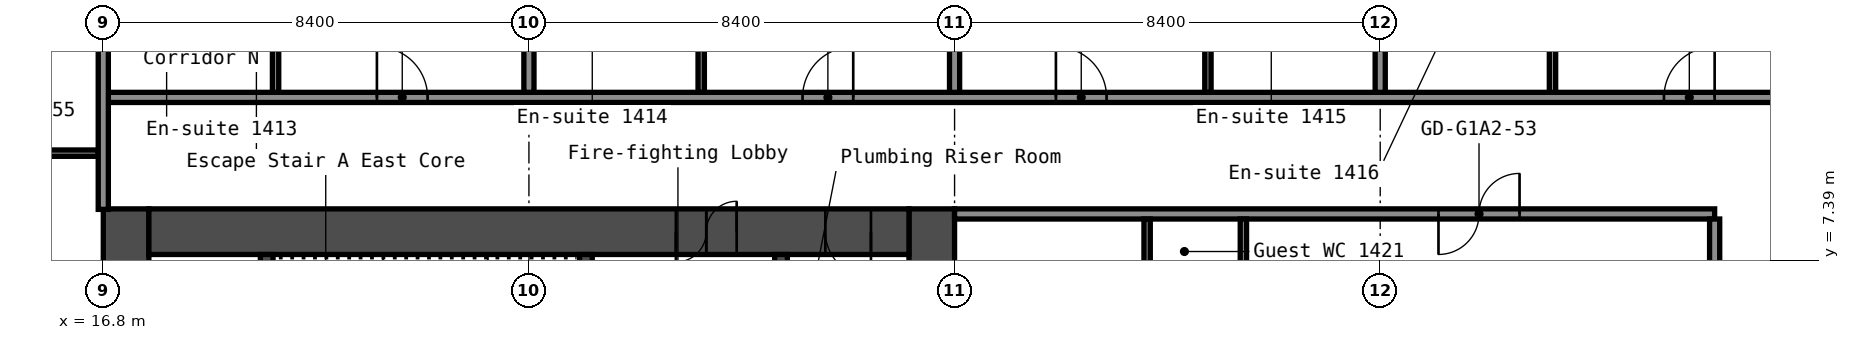
"""IFC4 building model, lengths in metres.
Left out: names, types, materials, properties, quantities, classifications, styles, units other than length and angle.
Written with IfcOpenShell. Run it as: python <this file> out.ifc"""

import sys

from ifc_helpers import new_model, si_unit, direction, frame, frame_2d, origin, place, context, subcontext, project, spatial, rectangle, extrude, element, fill, save


model = new_model("IFC4")
c1 = context("Model", 3, precision=1e-05, world=origin(), true_north=direction((0.0, 1.0)))
c2 = subcontext(c1, "Body", "Model", "MODEL_VIEW")
j1 = project(units=[si_unit("LENGTHUNIT", "METRE"), si_unit("PLANEANGLEUNIT", "RADIAN")], contexts=[c1])
p1 = place(None, origin())
s1 = spatial("IfcSite", under=j1, at=p1, CompositionType="ELEMENT")
p2 = place(p1, origin())
s2 = spatial("IfcBuilding", under=s1, at=p2, CompositionType="ELEMENT")
p3 = place(p2, frame((0.0, 0.0, 51.8)))
s3 = spatial("IfcBuildingStorey", under=s2, at=p3, CompositionType="ELEMENT", Elevation=51.8)
p4 = place(p3, frame((17.25, -8.4, 0.0), z_axis=(0.0, 0.0, 1.0), x_axis=(0.0, 1.0, 0.0)))
e1 = element("IfcWall", 1, at=p4, inside=s3, PredefinedType="SHEAR", context=c2, shape_type="SweptSolid", body=[
    extrude(rectangle(XDim=16.8, YDim=0.9, at=frame_2d((8.4, 0.0))), origin(), (0.0, 0.0, 1.0), 2.8),
])
p5 = place(p4, frame((12.75, 0.0, 0.0)))
e2 = element("IfcOpeningElement", 2, at=p5, cuts=e1, PredefinedType="OPENING", context=c2, shape_type="SweptSolid", body=[
    extrude(rectangle(XDim=1.2, YDim=2.1, at=frame_2d((0.6, 1.05))), frame((0.0, 0.46, 0.0), z_axis=(0.0, -1.0, 0.0), x_axis=(1.0, 0.0, 0.0)), (0.0, 0.0, 1.0), 0.92),
])
p6 = place(p4, frame((2.85, 0.0, 0.0)))
e3 = element("IfcOpeningElement", 3, at=p6, cuts=e1, PredefinedType="OPENING", context=c2, shape_type="SweptSolid", body=[
    extrude(rectangle(XDim=1.2, YDim=2.1, at=frame_2d((0.6, 1.05))), frame((0.0, 0.46, 0.0), z_axis=(0.0, -1.0, 0.0), x_axis=(1.0, 0.0, 0.0)), (0.0, 0.0, 1.0), 0.92),
])
p7 = place(p3, frame((33.15, -8.4, 0.0), z_axis=(0.0, 0.0, 1.0), x_axis=(0.0, 1.0, 0.0)))
e4 = element("IfcWall", 4, at=p7, inside=s3, PredefinedType="SHEAR", context=c2, shape_type="SweptSolid", body=[
    extrude(rectangle(XDim=16.8, YDim=0.9, at=frame_2d((8.4, 0.0))), origin(), (0.0, 0.0, 1.0), 2.8),
])
p8 = place(p3, frame((17.7, 7.95, 0.0), z_axis=(0.0, 0.0, 1.0), x_axis=(1.0, 0.0, 0.0)))
e5 = element("IfcWall", 5, at=p8, inside=s3, PredefinedType="SHEAR", context=c2, shape_type="SweptSolid", body=[
    extrude(rectangle(XDim=15.0, YDim=0.9, at=frame_2d((7.5, 0.0))), origin(), (0.0, 0.0, 1.0), 2.8),
])
p9 = place(p8, frame((10.4, 0.0, 0.0)))
e6 = element("IfcOpeningElement", 6, at=p9, cuts=e5, PredefinedType="OPENING", context=c2, shape_type="SweptSolid", body=[
    extrude(rectangle(XDim=1.2, YDim=2.1, at=frame_2d((0.6, 1.05))), frame((0.0, 0.46, 0.0), z_axis=(0.0, -1.0, 0.0), x_axis=(1.0, 0.0, 0.0)), (0.0, 0.0, 1.0), 0.92),
])
p10 = place(p8, frame((13.35, 0.0, 0.0)))
e7 = element("IfcOpeningElement", 7, at=p10, cuts=e5, PredefinedType="OPENING", context=c2, shape_type="SweptSolid", body=[
    extrude(rectangle(XDim=0.9, YDim=2.1, at=frame_2d((0.45, 1.05))), frame((0.0, 0.46, 0.0), z_axis=(0.0, -1.0, 0.0), x_axis=(1.0, 0.0, 0.0)), (0.0, 0.0, 1.0), 0.92),
])
p11 = place(p3, frame((20.025, 1.2, 0.0), z_axis=(0.0, 0.0, 1.0), x_axis=(0.0, 1.0, 0.0)))
e8 = element("IfcWall", 8, at=p11, inside=s3, PredefinedType="SHEAR", context=c2, shape_type="SweptSolid", body=[
    extrude(rectangle(XDim=6.3, YDim=0.25, at=frame_2d((3.15, 0.0))), origin(), (0.0, 0.0, 1.0), 2.8),
])
p12 = place(p3, frame((26.325, 3.75, 0.0), z_axis=(0.0, 0.0, 1.0), x_axis=(0.0, 1.0, 0.0)))
e9 = element("IfcWall", 9, at=p12, inside=s3, PredefinedType="SHEAR", context=c2, shape_type="SweptSolid", body=[
    extrude(rectangle(XDim=3.75, YDim=0.25, at=frame_2d((1.875, 0.0))), origin(), (0.0, 0.0, 1.0), 2.8),
])
p13 = place(p12, frame((1.25, 0.0, 0.0)))
e10 = element("IfcOpeningElement", 10, at=p13, cuts=e9, PredefinedType="OPENING", context=c2, shape_type="SweptSolid", body=[
    extrude(rectangle(XDim=1.2, YDim=2.1, at=frame_2d((0.6, 1.05))), frame((0.0, 0.135, 0.0), z_axis=(0.0, -1.0, 0.0), x_axis=(1.0, 0.0, 0.0)), (0.0, 0.0, 1.0), 0.27),
])
p14 = place(p3, frame((30.175, 1.45, 0.0), z_axis=(0.0, 0.0, 1.0), x_axis=(0.0, 1.0, 0.0)))
e11 = element("IfcWall", 11, at=p14, inside=s3, PredefinedType="SHEAR", context=c2, shape_type="SweptSolid", body=[
    extrude(rectangle(XDim=6.05, YDim=0.25, at=frame_2d((3.025, 0.0))), origin(), (0.0, 0.0, 1.0), 2.8),
])
p15 = place(p14, frame((2.625, 0.0, 0.0)))
e12 = element("IfcOpeningElement", 12, at=p15, cuts=e11, PredefinedType="OPENING", context=c2, shape_type="SweptSolid", body=[
    extrude(rectangle(XDim=1.1, YDim=2.1, at=frame_2d((0.55, 1.05))), frame((0.0, 0.135, 0.0), z_axis=(0.0, -1.0, 0.0), x_axis=(1.0, 0.0, 0.0)), (0.0, 0.0, 1.0), 0.27),
])
p16 = place(p3, frame((33.6, 8.3, 0.0), z_axis=(0.0, 0.0, 1.0), x_axis=(1.0, 0.0, 0.0)))
e13 = element("IfcWall", 13, at=p16, inside=s3, PredefinedType="PARTITIONING", context=c2, shape_type="SweptSolid", body=[
    extrude(rectangle(XDim=15.0, YDim=0.2, at=frame_2d((7.5, 0.0))), origin(), (0.0, 0.0, 1.0), 2.8),
])
p17 = place(p16, frame((9.55, 0.0, 0.0)))
e14 = element("IfcOpeningElement", 14, at=p17, cuts=e13, PredefinedType="OPENING", context=c2, shape_type="SweptSolid", body=[
    extrude(rectangle(XDim=1.6, YDim=2.1, at=frame_2d((0.8, 1.05))), frame((0.0, 0.11, 0.0), z_axis=(0.0, -1.0, 0.0), x_axis=(1.0, 0.0, 0.0)), (0.0, 0.0, 1.0), 0.22),
])
p18 = place(p3, frame((13.462, 9.5, 0.0), z_axis=(0.0, 0.0, 1.0), x_axis=(1.0, 0.0, 0.0)))
e15 = element("IfcWall", 15, at=p18, inside=s3, PredefinedType="PARTITIONING", context=c2, shape_type="SweptSolid", body=[
    extrude(rectangle(XDim=3.238, YDim=0.125, at=frame_2d((1.619, 0.0))), origin(), (0.0, 0.0, 1.0), 2.8),
])
p19 = place(p18, frame((1.238, 0.0, 0.0)))
e16 = element("IfcOpeningElement", 16, at=p19, cuts=e15, PredefinedType="OPENING", context=c2, shape_type="SweptSolid", body=[
    extrude(rectangle(XDim=0.8, YDim=2.1, at=frame_2d((0.4, 1.05))), frame((0.0, 0.073, 0.0), z_axis=(0.0, -1.0, 0.0), x_axis=(1.0, 0.0, 0.0)), (0.0, 0.0, 1.0), 0.145),
])
p20 = place(p3, frame((16.8, 10.6, 0.0), z_axis=(0.0, 0.0, 1.0), x_axis=(1.0, 0.0, 0.0)))
e17 = element("IfcWall", 17, at=p20, inside=s3, PredefinedType="PARTITIONING", context=c2, shape_type="SweptSolid", body=[
    extrude(rectangle(XDim=34.3, YDim=0.2, at=frame_2d((17.15, 0.0))), origin(), (0.0, 0.0, 1.0), 2.8),
])
p21 = place(p20, frame((5.4, 0.0, 0.0)))
e18 = element("IfcOpeningElement", 18, at=p21, cuts=e17, PredefinedType="OPENING", context=c2, shape_type="SweptSolid", body=[
    extrude(rectangle(XDim=1.0, YDim=2.1, at=frame_2d((0.5, 1.05))), frame((0.0, 0.11, 0.0), z_axis=(0.0, -1.0, 0.0), x_axis=(1.0, 0.0, 0.0)), (0.0, 0.0, 1.0), 0.22),
])
p22 = place(p20, frame((13.8, 0.0, 0.0)))
e19 = element("IfcOpeningElement", 19, at=p22, cuts=e17, PredefinedType="OPENING", context=c2, shape_type="SweptSolid", body=[
    extrude(rectangle(XDim=1.0, YDim=2.1, at=frame_2d((0.5, 1.05))), frame((0.0, 0.11, 0.0), z_axis=(0.0, -1.0, 0.0), x_axis=(1.0, 0.0, 0.0)), (0.0, 0.0, 1.0), 0.22),
])
p23 = place(p20, frame((18.8, 0.0, 0.0)))
e20 = element("IfcOpeningElement", 20, at=p23, cuts=e17, PredefinedType="OPENING", context=c2, shape_type="SweptSolid", body=[
    extrude(rectangle(XDim=1.0, YDim=2.1, at=frame_2d((0.5, 1.05))), frame((0.0, 0.11, 0.0), z_axis=(0.0, -1.0, 0.0), x_axis=(1.0, 0.0, 0.0)), (0.0, 0.0, 1.0), 0.22),
])
p24 = place(p20, frame((30.8, 0.0, 0.0)))
e21 = element("IfcOpeningElement", 21, at=p24, cuts=e17, PredefinedType="OPENING", context=c2, shape_type="SweptSolid", body=[
    extrude(rectangle(XDim=1.0, YDim=2.1, at=frame_2d((0.5, 1.05))), frame((0.0, 0.11, 0.0), z_axis=(0.0, -1.0, 0.0), x_axis=(1.0, 0.0, 0.0)), (0.0, 0.0, 1.0), 0.22),
])
p25 = place(p3, frame((16.8, 8.39, 0.0), z_axis=(0.0, 0.0, 1.0), x_axis=(0.0, 1.0, 0.0)))
e22 = element("IfcWall", 22, at=p25, inside=s3, PredefinedType="PARTITIONING", context=c2, shape_type="SweptSolid", body=[
    extrude(rectangle(XDim=11.91, YDim=0.2, at=frame_2d((5.955, 0.0))), origin(), (0.0, 0.0, 1.0), 2.8),
])
p26 = place(p3, frame((20.2, 10.7, 0.0), z_axis=(0.0, 0.0, 1.0), x_axis=(0.0, 1.0, 0.0)))
e23 = element("IfcWall", 23, at=p26, inside=s3, PredefinedType="PARTITIONING", context=c2, shape_type="SweptSolid", body=[
    extrude(rectangle(XDim=3.3, YDim=0.125, at=frame_2d((1.65, 0.0))), origin(), (0.0, 0.0, 1.0), 2.8),
])
p27 = place(p3, frame((25.2, 10.7, 0.0), z_axis=(0.0, 0.0, 1.0), x_axis=(0.0, 1.0, 0.0)))
e24 = element("IfcWall", 24, at=p27, inside=s3, PredefinedType="PARTITIONING", context=c2, shape_type="SweptSolid", body=[
    extrude(rectangle(XDim=9.6, YDim=0.2, at=frame_2d((4.8, 0.0))), origin(), (0.0, 0.0, 1.0), 2.8),
])
p28 = place(p3, frame((28.6, 10.7, 0.0), z_axis=(0.0, 0.0, 1.0), x_axis=(0.0, 1.0, 0.0)))
e25 = element("IfcWall", 25, at=p28, inside=s3, PredefinedType="PARTITIONING", context=c2, shape_type="SweptSolid", body=[
    extrude(rectangle(XDim=3.3, YDim=0.125, at=frame_2d((1.65, 0.0))), origin(), (0.0, 0.0, 1.0), 2.8),
])
p29 = place(p3, frame((33.6, 10.7, 0.0), z_axis=(0.0, 0.0, 1.0), x_axis=(0.0, 1.0, 0.0)))
e26 = element("IfcWall", 26, at=p29, inside=s3, PredefinedType="PARTITIONING", context=c2, shape_type="SweptSolid", body=[
    extrude(rectangle(XDim=9.6, YDim=0.2, at=frame_2d((4.8, 0.0))), origin(), (0.0, 0.0, 1.0), 2.8),
])
for number, where, z_axis, x_axis in (
    (27, (37.4, 4.9, 0.0), (0.0, 0.0, 1.0), (0.0, 1.0, 0.0)),
    (28, (38.6, 10.7, 0.0), (0.0, 0.0, 1.0), (0.0, 1.0, 0.0)),
):
    element("IfcWall", number, at=place(p3, frame(where, z_axis=z_axis, x_axis=x_axis)), inside=s3, PredefinedType="PARTITIONING", context=c2, shape_type="SweptSolid", body=[
        extrude(rectangle(XDim=3.3, YDim=0.125, at=frame_2d((1.65, 0.0))), origin(), (0.0, 0.0, 1.0), 2.8),
    ])
p30 = place(p3, frame((39.3, 5.9, 0.0), z_axis=(0.0, 0.0, 1.0), x_axis=(0.0, 1.0, 0.0)))
e29 = element("IfcWall", 29, at=p30, inside=s3, PredefinedType="PARTITIONING", context=c2, shape_type="SweptSolid", body=[
    extrude(rectangle(XDim=2.3, YDim=0.125, at=frame_2d((1.15, 0.0))), origin(), (0.0, 0.0, 1.0), 2.8),
])
p31 = place(p3, frame((42.0, 10.7, 0.0), z_axis=(0.0, 0.0, 1.0), x_axis=(0.0, 1.0, 0.0)))
e30 = element("IfcWall", 30, at=p31, inside=s3, PredefinedType="PARTITIONING", context=c2, shape_type="SweptSolid", body=[
    extrude(rectangle(XDim=9.6, YDim=0.2, at=frame_2d((4.8, 0.0))), origin(), (0.0, 0.0, 1.0), 2.8),
])
p32 = place(p3, frame((45.4, 10.7, 0.0), z_axis=(0.0, 0.0, 1.0), x_axis=(0.0, 1.0, 0.0)))
e31 = element("IfcWall", 31, at=p32, inside=s3, PredefinedType="PARTITIONING", context=c2, shape_type="SweptSolid", body=[
    extrude(rectangle(XDim=3.3, YDim=0.125, at=frame_2d((1.65, 0.0))), origin(), (0.0, 0.0, 1.0), 2.8),
])
p33 = place(p3, frame((48.6, -8.2, 0.0), z_axis=(0.0, 0.0, 1.0), x_axis=(0.0, 1.0, 0.0)))
e32 = element("IfcWall", 32, at=p33, inside=s3, PredefinedType="PARTITIONING", context=c2, shape_type="SweptSolid", body=[
    extrude(rectangle(XDim=16.4, YDim=0.2, at=frame_2d((8.2, 0.0))), origin(), (0.0, 0.0, 1.0), 2.8),
])
p34 = place(p9, origin())
e33 = element("IfcDoor", 33, at=p34, inside=s3, OperationType="DOUBLE_DOOR_SINGLE_SWING", PredefinedType="DOOR", context=c2, shape_type="SweptSolid", body=[
    extrude(rectangle(XDim=1.2, YDim=2.1, at=frame_2d((0.6, 1.05))), frame((0.0, 0.025, 0.0), z_axis=(0.0, -1.0, 0.0), x_axis=(1.0, 0.0, 0.0)), (0.0, 0.0, 1.0), 0.05),
])
fill(e6, e33)
p35 = place(p10, origin())
e34 = element("IfcDoor", 34, at=p35, inside=s3, OperationType="SINGLE_SWING_RIGHT", PredefinedType="DOOR", context=c2, shape_type="SweptSolid", body=[
    extrude(rectangle(XDim=0.9, YDim=2.1, at=frame_2d((0.45, 1.05))), frame((0.0, 0.025, 0.0), z_axis=(0.0, -1.0, 0.0), x_axis=(1.0, 0.0, 0.0)), (0.0, 0.0, 1.0), 0.05),
])
fill(e7, e34)
p36 = place(p17, origin())
e35 = element("IfcDoor", 35, at=p36, inside=s3, OperationType="DOUBLE_DOOR_SINGLE_SWING", PredefinedType="DOOR", context=c2, shape_type="SweptSolid", body=[
    extrude(rectangle(XDim=1.6, YDim=2.1, at=frame_2d((0.8, 1.05))), frame((0.0, 0.025, 0.0), z_axis=(0.0, -1.0, 0.0), x_axis=(1.0, 0.0, 0.0)), (0.0, 0.0, 1.0), 0.05),
])
fill(e14, e35)
p37 = place(p21, origin())
e36 = element("IfcDoor", 36, at=p37, inside=s3, OperationType="SINGLE_SWING_RIGHT", PredefinedType="DOOR", context=c2, shape_type="SweptSolid", body=[
    extrude(rectangle(XDim=1.0, YDim=2.1, at=frame_2d((0.5, 1.05))), frame((0.0, 0.025, 0.0), z_axis=(0.0, -1.0, 0.0), x_axis=(1.0, 0.0, 0.0)), (0.0, 0.0, 1.0), 0.05),
])
fill(e18, e36)
p38 = place(p22, origin())
e37 = element("IfcDoor", 37, at=p38, inside=s3, OperationType="SINGLE_SWING_LEFT", PredefinedType="DOOR", context=c2, shape_type="SweptSolid", body=[
    extrude(rectangle(XDim=1.0, YDim=2.1, at=frame_2d((0.5, 1.05))), frame((0.0, 0.025, 0.0), z_axis=(0.0, -1.0, 0.0), x_axis=(1.0, 0.0, 0.0)), (0.0, 0.0, 1.0), 0.05),
])
fill(e19, e37)
p39 = place(p23, origin())
e38 = element("IfcDoor", 38, at=p39, inside=s3, OperationType="SINGLE_SWING_RIGHT", PredefinedType="DOOR", context=c2, shape_type="SweptSolid", body=[
    extrude(rectangle(XDim=1.0, YDim=2.1, at=frame_2d((0.5, 1.05))), frame((0.0, 0.025, 0.0), z_axis=(0.0, -1.0, 0.0), x_axis=(1.0, 0.0, 0.0)), (0.0, 0.0, 1.0), 0.05),
])
fill(e20, e38)
p40 = place(p24, origin())
e39 = element("IfcDoor", 39, at=p40, inside=s3, OperationType="SINGLE_SWING_LEFT", PredefinedType="DOOR", context=c2, shape_type="SweptSolid", body=[
    extrude(rectangle(XDim=1.0, YDim=2.1, at=frame_2d((0.5, 1.05))), frame((0.0, 0.025, 0.0), z_axis=(0.0, -1.0, 0.0), x_axis=(1.0, 0.0, 0.0)), (0.0, 0.0, 1.0), 0.05),
])
fill(e21, e39)
save(model, sys.argv[1])
